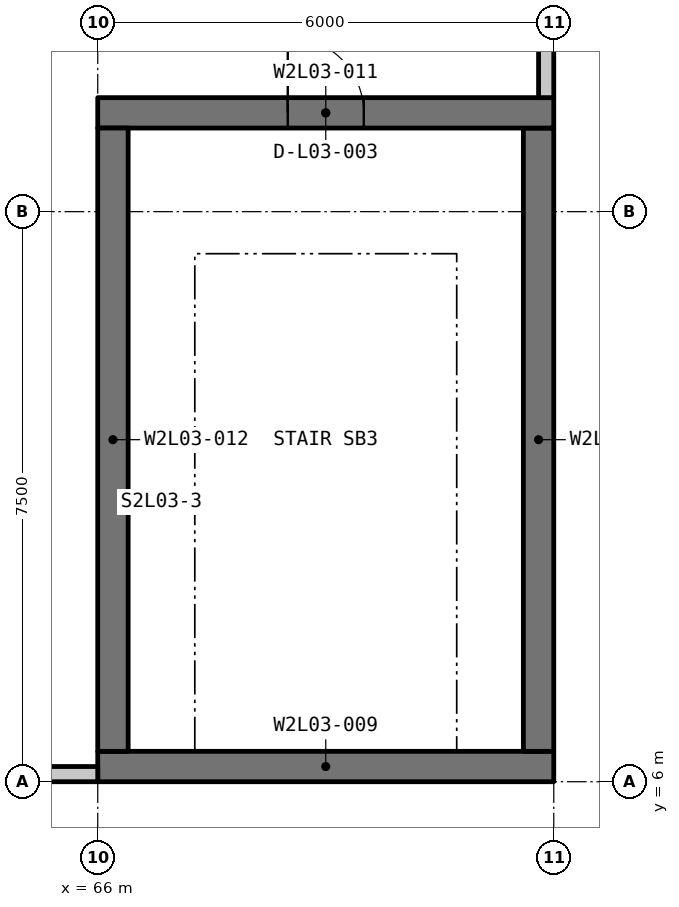
"""IFC4 building model, lengths in metres.
Left out: names, types, materials, properties, quantities, classifications, styles, units other than length and angle.
Written with IfcOpenShell. Run it as: python <this file> out.ifc"""

import sys

from ifc_helpers import new_model, si_unit, direction, frame, frame_2d, origin, place, context, subcontext, project, spatial, rectangle, extrude, element, fill, save


model = new_model("IFC4")
c1 = context("Model", 3, precision=1e-05, world=origin(), true_north=direction((0.0, 1.0)))
c2 = subcontext(c1, "Body", "Model", "MODEL_VIEW")
j1 = project(units=[si_unit("LENGTHUNIT", "METRE"), si_unit("PLANEANGLEUNIT", "RADIAN")], contexts=[c1])
p1 = place(None, origin())
s1 = spatial("IfcSite", under=j1, at=p1, CompositionType="ELEMENT")
p2 = place(p1, origin())
s2 = spatial("IfcBuilding", under=s1, at=p2, CompositionType="ELEMENT")
p3 = place(p2, frame((0.0, 0.0, 15.75)))
s3 = spatial("IfcBuildingStorey", under=s2, at=p3, CompositionType="ELEMENT", Elevation=15.75)
p4 = place(p3, frame((66.0, 6.2, -0.3), z_axis=(0.0, 0.0, 1.0), x_axis=(1.0, 0.0, 0.0)))
e1 = element("IfcWall", 1, at=p4, inside=s3, PredefinedType="SHEAR", context=c2, shape_type="SweptSolid", body=[
    extrude(rectangle(XDim=6.0, YDim=0.4, at=frame_2d((3.0, 0.0))), origin(), (0.0, 0.0, 1.0), 3.05),
])
p5 = place(p3, frame((71.8, 6.4, -0.3), z_axis=(0.0, 0.0, 1.0), x_axis=(0.0, 1.0, 0.0)))
e2 = element("IfcWall", 2, at=p5, inside=s3, PredefinedType="SHEAR", context=c2, shape_type="SweptSolid", body=[
    extrude(rectangle(XDim=8.2, YDim=0.4, at=frame_2d((4.1, 0.0))), origin(), (0.0, 0.0, 1.0), 3.05),
])
p6 = place(p3, frame((66.0, 14.8, -0.3), z_axis=(0.0, 0.0, 1.0), x_axis=(1.0, 0.0, 0.0)))
e3 = element("IfcWall", 3, at=p6, inside=s3, PredefinedType="SHEAR", context=c2, shape_type="SweptSolid", body=[
    extrude(rectangle(XDim=6.0, YDim=0.4, at=frame_2d((3.0, 0.0))), origin(), (0.0, 0.0, 1.0), 3.05),
])
p7 = place(p6, frame((2.5, 0.0, 0.3)))
e4 = element("IfcOpeningElement", 4, at=p7, cuts=e3, PredefinedType="OPENING", context=c2, shape_type="SweptSolid", body=[
    extrude(rectangle(XDim=1.0, YDim=2.2, at=frame_2d((0.5, 1.1))), frame((0.0, 0.21, 0.0), z_axis=(0.0, -1.0, 0.0), x_axis=(1.0, 0.0, 0.0)), (0.0, 0.0, 1.0), 0.42),
])
p8 = place(p3, frame((66.2, 6.4, -0.3), z_axis=(0.0, 0.0, 1.0), x_axis=(0.0, 1.0, 0.0)))
e5 = element("IfcWall", 5, at=p8, inside=s3, PredefinedType="SHEAR", context=c2, shape_type="SweptSolid", body=[
    extrude(rectangle(XDim=8.2, YDim=0.4, at=frame_2d((4.1, 0.0))), origin(), (0.0, 0.0, 1.0), 3.05),
])
p9 = place(p3, frame((66.0, 6.1, 0.0), z_axis=(0.0, 0.0, 1.0), x_axis=(-1.0, 0.0, 0.0)))
e6 = element("IfcWall", 6, at=p9, inside=s3, PredefinedType="PARAPET", context=c2, shape_type="SweptSolid", body=[
    extrude(rectangle(XDim=66.0, YDim=0.2, at=frame_2d((33.0, 0.0))), origin(), (0.0, 0.0, 1.0), 1.2),
])
p10 = place(p3, frame((71.9, 27.8, 0.0), z_axis=(0.0, 0.0, 1.0), x_axis=(0.0, -1.0, 0.0)))
e7 = element("IfcWall", 7, at=p10, inside=s3, PredefinedType="PARAPET", context=c2, shape_type="SweptSolid", body=[
    extrude(rectangle(XDim=12.8, YDim=0.2, at=frame_2d((6.4, 0.0))), origin(), (0.0, 0.0, 1.0), 1.2),
])
p11 = place(p7, origin())
e8 = element("IfcDoor", 8, at=p11, inside=s3, OperationType="SINGLE_SWING_LEFT", PredefinedType="DOOR", context=c2, shape_type="SweptSolid", body=[
    extrude(rectangle(XDim=1.0, YDim=2.2, at=frame_2d((0.5, 1.1))), frame((0.0, 0.025, 0.0), z_axis=(0.0, -1.0, 0.0), x_axis=(1.0, 0.0, 0.0)), (0.0, 0.0, 1.0), 0.05),
])
fill(e4, e8)
save(model, sys.argv[1])
